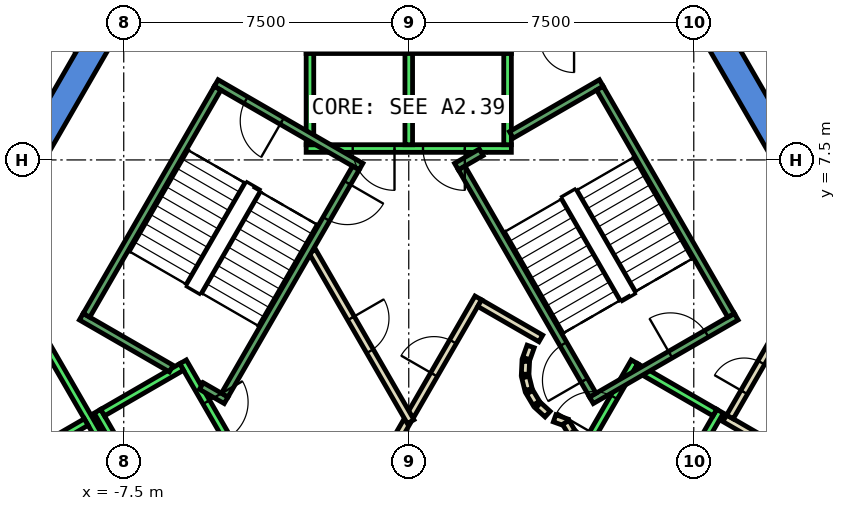
"""IFC4 building model, lengths in metres.
Left out: names, types, materials, properties, quantities, classifications, styles, units other than length and angle.
Written with IfcOpenShell. Run it as: python <this file> out.ifc"""

import sys

from ifc_helpers import new_model, si_unit, direction, frame, frame_2d, origin, place, context, subcontext, project, spatial, polyline, rectangle, outline, extrude, element, fill, save


model = new_model("IFC4")
c1 = context("Model", 3, precision=1e-05, world=origin(), true_north=direction((0.0, 1.0)))
c2 = subcontext(c1, "Body", "Model", "MODEL_VIEW")
j1 = project(units=[si_unit("LENGTHUNIT", "METRE"), si_unit("PLANEANGLEUNIT", "RADIAN")], contexts=[c1])
p1 = place(None, origin())
s1 = spatial("IfcSite", under=j1, at=p1, CompositionType="ELEMENT")
p2 = place(p1, origin())
s2 = spatial("IfcBuilding", under=s1, at=p2, CompositionType="ELEMENT")
p3 = place(p2, frame((0.0, 0.0, 189.8)))
s3 = spatial("IfcBuildingStorey", under=s2, at=p3, CompositionType="ELEMENT", Elevation=189.8)
p4 = place(p3, frame((0.0, 0.0, -0.6)))
e1 = element("IfcWall", 1, at=p4, inside=s3, PredefinedType="SHEAR", context=c2, shape_type="SweptSolid", body=[
    extrude(outline(polyline([(8.084, 11.498), (7.478, 11.148), (12.471, 2.5), (13.279, 2.5), (8.084, 11.498)])), origin(), (0.0, 0.0, 1.0), 4.4),
])
p5 = place(p3, frame((0.0, 0.0, -0.6)))
e2 = element("IfcWall", 2, at=p5, inside=s3, PredefinedType="SHEAR", context=c2, shape_type="SweptSolid", body=[
    extrude(outline(polyline([(-11.834, 5.002), (-11.228, 4.652), (-6.235, 13.3), (-6.64, 14.0), (-11.834, 5.002)])), origin(), (0.0, 0.0, 1.0), 4.4),
])
p6 = place(p3, frame((0.0, 0.0, -0.6)))
e3 = element("IfcWall", 3, at=p6, inside=s3, PredefinedType="SHEAR", context=c2, shape_type="SweptSolid", body=[
    extrude(outline(polyline([(-13.279, 2.5), (-6.64, -9.0), (-6.235, -8.3), (-12.471, 2.5), (-13.279, 2.5)])), origin(), (0.0, 0.0, 1.0), 4.4),
])
p7 = place(p3, frame((0.0, 0.0, -0.6)))
e4 = element("IfcWall", 4, at=p7, inside=s3, PredefinedType="SHEAR", context=c2, shape_type="SweptSolid", body=[
    extrude(outline(polyline([(6.64, -9.0), (13.279, 2.5), (12.471, 2.5), (6.235, -8.3), (6.64, -9.0)])), origin(), (0.0, 0.0, 1.0), 4.4),
])
p8 = place(p3, frame((10.653, -0.648, 0.0), z_axis=(0.0, 0.0, 1.0), x_axis=(-0.866036505625, 0.499980770555, 0.0)))
e5 = element("IfcWall", 5, at=p8, inside=s3, PredefinedType="PARTITIONING", context=c2, shape_type="SweptSolid", body=[
    extrude(rectangle(XDim=2.7, YDim=0.2, at=frame_2d((1.35, 0.0))), origin(), (0.0, 0.0, 1.0), 3.8),
])
p9 = place(p3, frame((8.451, 0.738, 0.0), z_axis=(0.0, 0.0, 1.0), x_axis=(0.499913221443, 0.866075499611, 0.0)))
e6 = element("IfcWall", 6, at=p9, inside=s3, PredefinedType="PARTITIONING", context=c2, shape_type="SweptSolid", body=[
    extrude(rectangle(XDim=2.4, YDim=0.2, at=frame_2d((1.2, 0.0))), origin(), (0.0, 0.0, 1.0), 3.8),
])
p10 = place(p9, frame((0.75, 0.0, 0.0)))
e7 = element("IfcOpeningElement", 7, at=p10, cuts=e6, PredefinedType="OPENING", context=c2, shape_type="SweptSolid", body=[
    extrude(rectangle(XDim=0.9, YDim=2.1, at=frame_2d((0.45, 1.05))), frame((0.0, 0.11, 0.0), z_axis=(0.0, -1.0, 0.0), x_axis=(1.0, 0.0, 0.0)), (0.0, 0.0, 1.0), 0.22),
])
p11 = place(p3, frame((-0.982, -1.0, 0.0), z_axis=(0.0, 0.0, 1.0), x_axis=(0.50024047865, 0.865886518847, 0.0)))
e8 = element("IfcWall", 8, at=p11, inside=s3, PredefinedType="PARTITIONING", context=c2, shape_type="SweptSolid", body=[
    extrude(rectangle(XDim=1.863, YDim=0.2, at=frame_2d((0.931, 0.0))), origin(), (0.0, 0.0, 1.0), 3.8),
])
p12 = place(p3, frame((0.05, 0.787, 0.0), z_axis=(0.0, 0.0, 1.0), x_axis=(0.499954076797, 0.866051915934, 0.0)))
e9 = element("IfcWall", 9, at=p12, inside=s3, PredefinedType="PARTITIONING", context=c2, shape_type="SweptSolid", body=[
    extrude(rectangle(XDim=3.558, YDim=0.2, at=frame_2d((1.779, 0.0))), origin(), (0.0, 0.0, 1.0), 3.8),
])
p13 = place(p12, frame((1.229, 0.0, 0.0)))
e10 = element("IfcOpeningElement", 10, at=p13, cuts=e9, PredefinedType="OPENING", context=c2, shape_type="SweptSolid", body=[
    extrude(rectangle(XDim=1.0, YDim=2.1, at=frame_2d((0.5, 1.05))), frame((0.0, 0.11, 0.0), z_axis=(0.0, -1.0, 0.0), x_axis=(1.0, 0.0, 0.0)), (0.0, 0.0, 1.0), 0.22),
])
p14 = place(p3, frame((1.866, 3.732, 0.0), z_axis=(0.0, 0.0, 1.0), x_axis=(0.866043361281, -0.499968895414, 0.0)))
e11 = element("IfcWall", 11, at=p14, inside=s3, PredefinedType="PARTITIONING", context=c2, shape_type="SweptSolid", body=[
    extrude(rectangle(XDim=1.858, YDim=0.2, at=frame_2d((0.929, 0.0))), origin(), (0.0, 0.0, 1.0), 3.8),
])
p15 = place(p3, frame((3.208, 2.592, 0.0), z_axis=(0.0, 0.0, 1.0), x_axis=(-0.337388820924, -0.941365382578, 0.0)))
e12 = element("IfcWall", 12, at=p15, inside=s3, PredefinedType="PARTITIONING", context=c2, shape_type="SweptSolid", body=[
    extrude(rectangle(XDim=0.338, YDim=0.2, at=frame_2d((0.169, 0.0))), origin(), (0.0, 0.0, 1.0), 3.8),
])
p16 = place(p3, frame((3.079, 2.199, 0.0), z_axis=(0.0, 0.0, 1.0), x_axis=(-0.047771483479, -0.998858290933, 0.0)))
e13 = element("IfcWall", 13, at=p16, inside=s3, PredefinedType="PARTITIONING", context=c2, shape_type="SweptSolid", body=[
    extrude(rectangle(XDim=0.337, YDim=0.2, at=frame_2d((0.169, 0.0))), origin(), (0.0, 0.0, 1.0), 3.8),
])
p17 = place(p3, frame((3.07, 1.786, 0.0), z_axis=(0.0, 0.0, 1.0), x_axis=(0.242705583207, -0.970099994784, 0.0)))
e14 = element("IfcWall", 14, at=p17, inside=s3, PredefinedType="PARTITIONING", context=c2, shape_type="SweptSolid", body=[
    extrude(rectangle(XDim=0.338, YDim=0.2, at=frame_2d((0.169, 0.0))), origin(), (0.0, 0.0, 1.0), 3.8),
])
for number, where, z_axis, x_axis in (
    (15, (3.182, 1.388, 0.0), (0.0, 0.0, 1.0), (0.512, -0.859, 0.0)),
    (16, (3.404, 1.039, 0.0), (0.0, 0.0, 1.0), (0.74, -0.672, 0.0)),
):
    element("IfcWall", number, at=place(p3, frame(where, z_axis=z_axis, x_axis=x_axis)), inside=s3, PredefinedType="PARTITIONING", context=c2, shape_type="SweptSolid", body=[
        extrude(rectangle(XDim=0.338, YDim=0.2, at=frame_2d((0.169, 0.0))), origin(), (0.0, 0.0, 1.0), 3.8),
    ])
p18 = place(p3, frame((3.838, 0.702, 0.0), z_axis=(0.0, 0.0, 1.0), x_axis=(0.941035081519, -0.338308993895, 0.0)))
e17 = element("IfcWall", 17, at=p18, inside=s3, PredefinedType="PARTITIONING", context=c2, shape_type="SweptSolid", body=[
    extrude(rectangle(XDim=0.337, YDim=0.2, at=frame_2d((0.168, 0.0))), origin(), (0.0, 0.0, 1.0), 3.8),
])
p19 = place(p3, frame((4.132, 0.593, 0.0), z_axis=(0.0, 0.0, 1.0), x_axis=(0.513561617048, -0.858052717201, 0.0)))
e18 = element("IfcWall", 18, at=p19, inside=s3, PredefinedType="PARTITIONING", context=c2, shape_type="SweptSolid", body=[
    extrude(rectangle(XDim=0.308, YDim=0.2, at=frame_2d((0.154, 0.0))), origin(), (0.0, 0.0, 1.0), 3.8),
])
p20 = place(p3, frame((4.301, 0.315, 0.0), z_axis=(0.0, 0.0, 1.0), x_axis=(0.741798017506, -0.670623367639, 0.0)))
e19 = element("IfcWall", 19, at=p20, inside=s3, PredefinedType="PARTITIONING", context=c2, shape_type="SweptSolid", body=[
    extrude(rectangle(XDim=0.309, YDim=0.2, at=frame_2d((0.154, 0.0))), origin(), (0.0, 0.0, 1.0), 3.8),
])
p21 = place(p3, frame((-2.54, 5.1, 0.0), z_axis=(0.0, 0.0, 1.0), x_axis=(0.499925051871, -0.866068670783, 0.0)))
e20 = element("IfcWall", 20, at=p21, inside=s3, PredefinedType="PARTITIONING", context=c2, shape_type="SweptSolid", body=[
    extrude(rectangle(XDim=5.181, YDim=0.2, at=frame_2d((2.59, 0.0))), origin(), (0.0, 0.0, 1.0), 3.8),
])
p22 = place(p21, frame((2.04, 0.0, 0.0)))
e21 = element("IfcOpeningElement", 21, at=p22, cuts=e20, PredefinedType="OPENING", context=c2, shape_type="SweptSolid", body=[
    extrude(rectangle(XDim=1.0, YDim=2.1, at=frame_2d((0.5, 1.05))), frame((0.0, 0.11, 0.0), z_axis=(0.0, -1.0, 0.0), x_axis=(1.0, 0.0, 0.0)), (0.0, 0.0, 1.0), 0.22),
])
p23 = place(p3, frame((2.7, 7.8, 0.0), z_axis=(0.0, 0.0, 1.0), x_axis=(-1.0, 0.0, 0.0)))
e22 = element("IfcWall", 22, at=p23, inside=s3, PredefinedType="STANDARD", context=c2, shape_type="SweptSolid", body=[
    extrude(rectangle(XDim=5.4, YDim=0.2, at=frame_2d((2.7, 0.0))), origin(), (0.0, 0.0, 1.0), 3.8),
])
p24 = place(p23, frame((1.225, 0.0, 0.0)))
e23 = element("IfcOpeningElement", 23, at=p24, cuts=e22, PredefinedType="OPENING", context=c2, shape_type="SweptSolid", body=[
    extrude(rectangle(XDim=1.1, YDim=2.1, at=frame_2d((0.55, 1.05))), frame((0.0, 0.11, 0.0), z_axis=(0.0, -1.0, 0.0), x_axis=(1.0, 0.0, 0.0)), (0.0, 0.0, 1.0), 0.22),
])
p25 = place(p23, frame((3.075, 0.0, 0.0)))
e24 = element("IfcOpeningElement", 24, at=p25, cuts=e22, PredefinedType="OPENING", context=c2, shape_type="SweptSolid", body=[
    extrude(rectangle(XDim=1.1, YDim=2.1, at=frame_2d((0.55, 1.05))), frame((0.0, 0.11, 0.0), z_axis=(0.0, -1.0, 0.0), x_axis=(1.0, 0.0, 0.0)), (0.0, 0.0, 1.0), 0.22),
])
p26 = place(p3, frame((2.7, 10.4, 0.0), z_axis=(0.0, 0.0, 1.0), x_axis=(-1.0, 0.0, 0.0)))
e25 = element("IfcWall", 25, at=p26, inside=s3, PredefinedType="STANDARD", context=c2, shape_type="SweptSolid", body=[
    extrude(rectangle(XDim=5.4, YDim=0.2, at=frame_2d((2.7, 0.0))), origin(), (0.0, 0.0, 1.0), 3.8),
])
for number, where, z_axis, x_axis in (
    (26, (2.6, 7.9, 0.0), (0.0, 0.0, 1.0), (0.0, 1.0, 0.0)),
    (27, (0.0, 7.9, 0.0), (0.0, 0.0, 1.0), (0.0, 1.0, 0.0)),
    (28, (-2.6, 7.9, 0.0), (0.0, 0.0, 1.0), (0.0, 1.0, 0.0)),
):
    element("IfcWall", number, at=place(p3, frame(where, z_axis=z_axis, x_axis=x_axis)), inside=s3, PredefinedType="STANDARD", context=c2, shape_type="SweptSolid", body=[
        extrude(rectangle(XDim=2.4, YDim=0.2, at=frame_2d((1.2, 0.0))), origin(), (0.0, 0.0, 1.0), 3.8),
    ])
p27 = place(p3, frame((-5.94, 2.188, 0.0), z_axis=(0.0, 0.0, 1.0), x_axis=(0.500034260056, -0.866005622828, 0.0)))
e29 = element("IfcWall", 29, at=p27, inside=s3, PredefinedType="STANDARD", context=c2, shape_type="SweptSolid", body=[
    extrude(rectangle(XDim=5.399, YDim=0.2, at=frame_2d((2.7, 0.0))), origin(), (0.0, 0.0, 1.0), 3.8),
])
p28 = place(p27, frame((3.075, 0.0, 0.0)))
e30 = element("IfcOpeningElement", 30, at=p28, cuts=e29, PredefinedType="OPENING", context=c2, shape_type="SweptSolid", body=[
    extrude(rectangle(XDim=1.1, YDim=2.1, at=frame_2d((0.55, 1.05))), frame((0.0, 0.11, 0.0), z_axis=(0.0, -1.0, 0.0), x_axis=(1.0, 0.0, 0.0)), (0.0, 0.0, 1.0), 0.22),
])
p29 = place(p27, frame((1.225, 0.0, 0.0)))
e31 = element("IfcOpeningElement", 31, at=p29, cuts=e29, PredefinedType="OPENING", context=c2, shape_type="SweptSolid", body=[
    extrude(rectangle(XDim=1.1, YDim=2.1, at=frame_2d((0.55, 1.05))), frame((0.0, 0.11, 0.0), z_axis=(0.0, -1.0, 0.0), x_axis=(1.0, 0.0, 0.0)), (0.0, 0.0, 1.0), 0.22),
])
p30 = place(p3, frame((-8.192, 0.888, 0.0), z_axis=(0.0, 0.0, 1.0), x_axis=(0.500034260056, -0.866005622828, 0.0)))
e32 = element("IfcWall", 32, at=p30, inside=s3, PredefinedType="STANDARD", context=c2, shape_type="SweptSolid", body=[
    extrude(rectangle(XDim=5.399, YDim=0.2, at=frame_2d((2.7, 0.0))), origin(), (0.0, 0.0, 1.0), 3.8),
])
p31 = place(p3, frame((-5.977, 2.052, 0.0), z_axis=(0.0, 0.0, 1.0), x_axis=(-0.865973769406, -0.500089422704, 0.0)))
e33 = element("IfcWall", 33, at=p31, inside=s3, PredefinedType="STANDARD", context=c2, shape_type="SweptSolid", body=[
    extrude(rectangle(XDim=2.399, YDim=0.2, at=frame_2d((1.2, 0.0))), origin(), (0.0, 0.0, 1.0), 3.8),
])
p32 = place(p3, frame((-9.751, 2.99, 0.0), z_axis=(0.0, 0.0, 1.0), x_axis=(0.50000090737, -0.866024879913, 0.0)))
e34 = element("IfcWall", 34, at=p32, inside=s3, PredefinedType="STANDARD", context=c2, shape_type="SweptSolid", body=[
    extrude(rectangle(XDim=10.6, YDim=0.2, at=frame_2d((5.3, 0.0))), origin(), (0.0, 0.0, 1.0), 3.8),
])
p33 = place(p3, frame((-8.488, 0.602, 0.0), z_axis=(0.0, 0.0, 1.0), x_axis=(-0.866022959057, -0.500004234368, 0.0)))
e35 = element("IfcWall", 35, at=p33, inside=s3, PredefinedType="STANDARD", context=c2, shape_type="SweptSolid", body=[
    extrude(rectangle(XDim=2.5, YDim=0.2, at=frame_2d((1.25, 0.0))), origin(), (0.0, 0.0, 1.0), 3.8),
])
p34 = place(p3, frame((3.24, -2.488, 0.0), z_axis=(0.0, 0.0, 1.0), x_axis=(0.500034260056, 0.866005622828, 0.0)))
e36 = element("IfcWall", 36, at=p34, inside=s3, PredefinedType="STANDARD", context=c2, shape_type="SweptSolid", body=[
    extrude(rectangle(XDim=5.399, YDim=0.2, at=frame_2d((2.7, 0.0))), origin(), (0.0, 0.0, 1.0), 3.8),
])
p35 = place(p34, frame((3.225, 0.0, 0.0)))
e37 = element("IfcOpeningElement", 37, at=p35, cuts=e36, PredefinedType="OPENING", context=c2, shape_type="SweptSolid", body=[
    extrude(rectangle(XDim=1.1, YDim=2.1, at=frame_2d((0.55, 1.05))), frame((0.0, 0.11, 0.0), z_axis=(0.0, -1.0, 0.0), x_axis=(1.0, 0.0, 0.0)), (0.0, 0.0, 1.0), 0.22),
])
p36 = place(p34, frame((1.225, 0.0, 0.0)))
e38 = element("IfcOpeningElement", 38, at=p36, cuts=e36, PredefinedType="OPENING", context=c2, shape_type="SweptSolid", body=[
    extrude(rectangle(XDim=1.1, YDim=2.1, at=frame_2d((0.55, 1.05))), frame((0.0, 0.11, 0.0), z_axis=(0.0, -1.0, 0.0), x_axis=(1.0, 0.0, 0.0)), (0.0, 0.0, 1.0), 0.22),
])
p37 = place(p3, frame((5.492, -3.788, 0.0), z_axis=(0.0, 0.0, 1.0), x_axis=(0.500034260056, 0.866005622828, 0.0)))
e39 = element("IfcWall", 39, at=p37, inside=s3, PredefinedType="STANDARD", context=c2, shape_type="SweptSolid", body=[
    extrude(rectangle(XDim=5.399, YDim=0.2, at=frame_2d((2.7, 0.0))), origin(), (0.0, 0.0, 1.0), 3.8),
])
p38 = place(p3, frame((5.977, 2.052, 0.0), z_axis=(0.0, 0.0, 1.0), x_axis=(0.865973769406, -0.500089422704, 0.0)))
e40 = element("IfcWall", 40, at=p38, inside=s3, PredefinedType="STANDARD", context=c2, shape_type="SweptSolid", body=[
    extrude(rectangle(XDim=2.399, YDim=0.2, at=frame_2d((1.2, 0.0))), origin(), (0.0, 0.0, 1.0), 3.8),
])
p39 = place(p3, frame((4.806, 1.176, 0.0), z_axis=(0.0, 0.0, 1.0), x_axis=(0.866059941101, 0.499940174841, 0.0)))
e41 = element("IfcWall", 41, at=p39, inside=s3, PredefinedType="STANDARD", context=c2, shape_type="SweptSolid", body=[
    extrude(rectangle(XDim=4.4, YDim=0.2, at=frame_2d((2.2, 0.0))), origin(), (0.0, 0.0, 1.0), 3.8),
])
p40 = place(p39, frame((2.4, 0.0, 0.0)))
e42 = element("IfcOpeningElement", 42, at=p40, cuts=e41, PredefinedType="OPENING", context=c2, shape_type="SweptSolid", body=[
    extrude(rectangle(XDim=1.1, YDim=2.2, at=frame_2d((0.55, 1.1))), frame((0.0, 0.11, 0.0), z_axis=(0.0, -1.0, 0.0), x_axis=(1.0, 0.0, 0.0)), (0.0, 0.0, 1.0), 0.22),
])
p41 = place(p3, frame((2.7, 8.158, 0.0), z_axis=(0.0, 0.0, 1.0), x_axis=(0.86611865017, 0.499838457731, 0.0)))
e43 = element("IfcWall", 43, at=p41, inside=s3, PredefinedType="STANDARD", context=c2, shape_type="SweptSolid", body=[
    extrude(rectangle(XDim=2.733, YDim=0.2, at=frame_2d((1.366, 0.0))), origin(), (0.0, 0.0, 1.0), 3.8),
])
p42 = place(p3, frame((1.256, 7.324, 0.0), z_axis=(0.0, 0.0, 1.0), x_axis=(0.865915093549, 0.500191014278, 0.0)))
e44 = element("IfcWall", 44, at=p42, inside=s3, PredefinedType="STANDARD", context=c2, shape_type="SweptSolid", body=[
    extrude(rectangle(XDim=0.752, YDim=0.2, at=frame_2d((0.376, 0.0))), origin(), (0.0, 0.0, 1.0), 3.8),
])
p43 = place(p3, frame((4.843, 1.312, 0.0), z_axis=(0.0, 0.0, 1.0), x_axis=(-0.499963383562, 0.866046543262, 0.0)))
e45 = element("IfcWall", 45, at=p43, inside=s3, PredefinedType="STANDARD", context=c2, shape_type="SweptSolid", body=[
    extrude(rectangle(XDim=6.9, YDim=0.2, at=frame_2d((3.45, 0.0))), origin(), (0.0, 0.0, 1.0), 3.8),
])
p44 = place(p43, frame((0.45, 0.0, 0.0)))
e46 = element("IfcOpeningElement", 46, at=p44, cuts=e45, PredefinedType="OPENING", context=c2, shape_type="SweptSolid", body=[
    extrude(rectangle(XDim=1.1, YDim=2.2, at=frame_2d((0.55, 1.1))), frame((0.0, 0.11, 0.0), z_axis=(0.0, -1.0, 0.0), x_axis=(1.0, 0.0, 0.0)), (0.0, 0.0, 1.0), 0.22),
])
p45 = place(p3, frame((8.48, 3.412, 0.0), z_axis=(0.0, 0.0, 1.0), x_axis=(-0.499978703459, 0.866037698999, 0.0)))
e47 = element("IfcWall", 47, at=p45, inside=s3, PredefinedType="STANDARD", context=c2, shape_type="SweptSolid", body=[
    extrude(rectangle(XDim=6.9, YDim=0.2, at=frame_2d((3.45, 0.0))), origin(), (0.0, 0.0, 1.0), 3.8),
])
p46 = place(p3, frame((-1.256, 7.324, 0.0), z_axis=(0.0, 0.0, 1.0), x_axis=(-0.866046073146, 0.499964197906, 0.0)))
e48 = element("IfcWall", 48, at=p46, inside=s3, PredefinedType="STANDARD", context=c2, shape_type="SweptSolid", body=[
    extrude(rectangle(XDim=4.4, YDim=0.2, at=frame_2d((2.2, 0.0))), origin(), (0.0, 0.0, 1.0), 3.8),
])
p47 = place(p46, frame((2.4, 0.0, 0.0)))
e49 = element("IfcOpeningElement", 49, at=p47, cuts=e48, PredefinedType="OPENING", context=c2, shape_type="SweptSolid", body=[
    extrude(rectangle(XDim=1.1, YDim=2.2, at=frame_2d((0.55, 1.1))), frame((0.0, 0.11, 0.0), z_axis=(0.0, -1.0, 0.0), x_axis=(1.0, 0.0, 0.0)), (0.0, 0.0, 1.0), 0.22),
])
p48 = place(p3, frame((-6.25, 2.01, 0.0), z_axis=(0.0, 0.0, 1.0), x_axis=(-0.86611865017, 0.499838457731, 0.0)))
e50 = element("IfcWall", 50, at=p48, inside=s3, PredefinedType="STANDARD", context=c2, shape_type="SweptSolid", body=[
    extrude(rectangle(XDim=2.733, YDim=0.2, at=frame_2d((1.366, 0.0))), origin(), (0.0, 0.0, 1.0), 3.8),
])
p49 = place(p3, frame((-4.806, 1.176, 0.0), z_axis=(0.0, 0.0, 1.0), x_axis=(-0.866558586415, 0.499075361355, 0.0)))
e51 = element("IfcWall", 51, at=p49, inside=s3, PredefinedType="STANDARD", context=c2, shape_type="SweptSolid", body=[
    extrude(rectangle(XDim=0.751, YDim=0.2, at=frame_2d((0.376, 0.0))), origin(), (0.0, 0.0, 1.0), 3.8),
])
p50 = place(p3, frame((-1.393, 7.288, 0.0), z_axis=(0.0, 0.0, 1.0), x_axis=(-0.499963383562, -0.866046543262, 0.0)))
e52 = element("IfcWall", 52, at=p50, inside=s3, PredefinedType="STANDARD", context=c2, shape_type="SweptSolid", body=[
    extrude(rectangle(XDim=6.9, YDim=0.2, at=frame_2d((3.45, 0.0))), origin(), (0.0, 0.0, 1.0), 3.8),
])
p51 = place(p50, frame((0.45, 0.0, 0.0)))
e53 = element("IfcOpeningElement", 53, at=p51, cuts=e52, PredefinedType="OPENING", context=c2, shape_type="SweptSolid", body=[
    extrude(rectangle(XDim=1.1, YDim=2.2, at=frame_2d((0.55, 1.1))), frame((0.0, 0.11, 0.0), z_axis=(0.0, -1.0, 0.0), x_axis=(1.0, 0.0, 0.0)), (0.0, 0.0, 1.0), 0.22),
])
p52 = place(p3, frame((-5.03, 9.388, 0.0), z_axis=(0.0, 0.0, 1.0), x_axis=(-0.499978703459, -0.866037698999, 0.0)))
e54 = element("IfcWall", 54, at=p52, inside=s3, PredefinedType="STANDARD", context=c2, shape_type="SweptSolid", body=[
    extrude(rectangle(XDim=6.9, YDim=0.2, at=frame_2d((3.45, 0.0))), origin(), (0.0, 0.0, 1.0), 3.8),
])
p53 = place(p13, origin())
e55 = element("IfcDoor", 55, at=p53, inside=s3, OperationType="SINGLE_SWING_RIGHT", PredefinedType="DOOR", context=c2, shape_type="SweptSolid", body=[
    extrude(rectangle(XDim=1.0, YDim=2.1, at=frame_2d((0.5, 1.05))), frame((0.0, 0.025, 0.0), z_axis=(0.0, -1.0, 0.0), x_axis=(1.0, 0.0, 0.0)), (0.0, 0.0, 1.0), 0.05),
])
fill(e10, e55)
p54 = place(p22, origin())
e56 = element("IfcDoor", 56, at=p54, inside=s3, OperationType="SINGLE_SWING_RIGHT", PredefinedType="DOOR", context=c2, shape_type="SweptSolid", body=[
    extrude(rectangle(XDim=1.0, YDim=2.1, at=frame_2d((0.5, 1.05))), frame((0.0, 0.025, 0.0), z_axis=(0.0, -1.0, 0.0), x_axis=(1.0, 0.0, 0.0)), (0.0, 0.0, 1.0), 0.05),
])
fill(e21, e56)
p55 = place(p10, origin())
e57 = element("IfcDoor", 57, at=p55, inside=s3, OperationType="SINGLE_SWING_LEFT", PredefinedType="DOOR", context=c2, shape_type="SweptSolid", body=[
    extrude(rectangle(XDim=0.9, YDim=2.1, at=frame_2d((0.45, 1.05))), frame((0.0, 0.025, 0.0), z_axis=(0.0, -1.0, 0.0), x_axis=(1.0, 0.0, 0.0)), (0.0, 0.0, 1.0), 0.05),
])
fill(e7, e57)
p56 = place(p24, origin())
e58 = element("IfcDoor", 58, at=p56, inside=s3, OperationType="SLIDING_TO_LEFT", PredefinedType="DOOR", context=c2, shape_type="SweptSolid", body=[
    extrude(rectangle(XDim=1.1, YDim=2.1, at=frame_2d((0.55, 1.05))), frame((0.0, 0.025, 0.0), z_axis=(0.0, -1.0, 0.0), x_axis=(1.0, 0.0, 0.0)), (0.0, 0.0, 1.0), 0.05),
])
fill(e23, e58)
p57 = place(p25, origin())
e59 = element("IfcDoor", 59, at=p57, inside=s3, OperationType="SLIDING_TO_LEFT", PredefinedType="DOOR", context=c2, shape_type="SweptSolid", body=[
    extrude(rectangle(XDim=1.1, YDim=2.1, at=frame_2d((0.55, 1.05))), frame((0.0, 0.025, 0.0), z_axis=(0.0, -1.0, 0.0), x_axis=(1.0, 0.0, 0.0)), (0.0, 0.0, 1.0), 0.05),
])
fill(e24, e59)
p58 = place(p35, origin())
e60 = element("IfcDoor", 60, at=p58, inside=s3, OperationType="SLIDING_TO_LEFT", PredefinedType="DOOR", context=c2, shape_type="SweptSolid", body=[
    extrude(rectangle(XDim=1.1, YDim=2.1, at=frame_2d((0.55, 1.05))), frame((0.0, 0.025, 0.0), z_axis=(0.0, -1.0, 0.0), x_axis=(1.0, 0.0, 0.0)), (0.0, 0.0, 1.0), 0.05),
])
fill(e37, e60)
p59 = place(p29, origin())
e61 = element("IfcDoor", 61, at=p59, inside=s3, OperationType="SLIDING_TO_LEFT", PredefinedType="DOOR", context=c2, shape_type="SweptSolid", body=[
    extrude(rectangle(XDim=1.1, YDim=2.1, at=frame_2d((0.55, 1.05))), frame((0.0, 0.025, 0.0), z_axis=(0.0, -1.0, 0.0), x_axis=(1.0, 0.0, 0.0)), (0.0, 0.0, 1.0), 0.05),
])
fill(e31, e61)
p60 = place(p44, origin())
e62 = element("IfcDoor", 62, at=p60, inside=s3, OperationType="SINGLE_SWING_LEFT", PredefinedType="DOOR", context=c2, shape_type="SweptSolid", body=[
    extrude(rectangle(XDim=1.1, YDim=2.2, at=frame_2d((0.55, 1.1))), frame((0.0, 0.025, 0.0), z_axis=(0.0, -1.0, 0.0), x_axis=(1.0, 0.0, 0.0)), (0.0, 0.0, 1.0), 0.05),
])
fill(e46, e62)
p61 = place(p40, origin())
e63 = element("IfcDoor", 63, at=p61, inside=s3, OperationType="SINGLE_SWING_LEFT", PredefinedType="DOOR", context=c2, shape_type="SweptSolid", body=[
    extrude(rectangle(XDim=1.1, YDim=2.2, at=frame_2d((0.55, 1.1))), frame((0.0, 0.025, 0.0), z_axis=(0.0, -1.0, 0.0), x_axis=(1.0, 0.0, 0.0)), (0.0, 0.0, 1.0), 0.05),
])
fill(e42, e63)
p62 = place(p51, origin())
e64 = element("IfcDoor", 64, at=p62, inside=s3, OperationType="SINGLE_SWING_LEFT", PredefinedType="DOOR", context=c2, shape_type="SweptSolid", body=[
    extrude(rectangle(XDim=1.1, YDim=2.2, at=frame_2d((0.55, 1.1))), frame((0.0, 0.025, 0.0), z_axis=(0.0, -1.0, 0.0), x_axis=(1.0, 0.0, 0.0)), (0.0, 0.0, 1.0), 0.05),
])
fill(e53, e64)
p63 = place(p47, origin())
e65 = element("IfcDoor", 65, at=p63, inside=s3, OperationType="SINGLE_SWING_LEFT", PredefinedType="DOOR", context=c2, shape_type="SweptSolid", body=[
    extrude(rectangle(XDim=1.1, YDim=2.2, at=frame_2d((0.55, 1.1))), frame((0.0, 0.025, 0.0), z_axis=(0.0, -1.0, 0.0), x_axis=(1.0, 0.0, 0.0)), (0.0, 0.0, 1.0), 0.05),
])
fill(e49, e65)
save(model, sys.argv[1])
